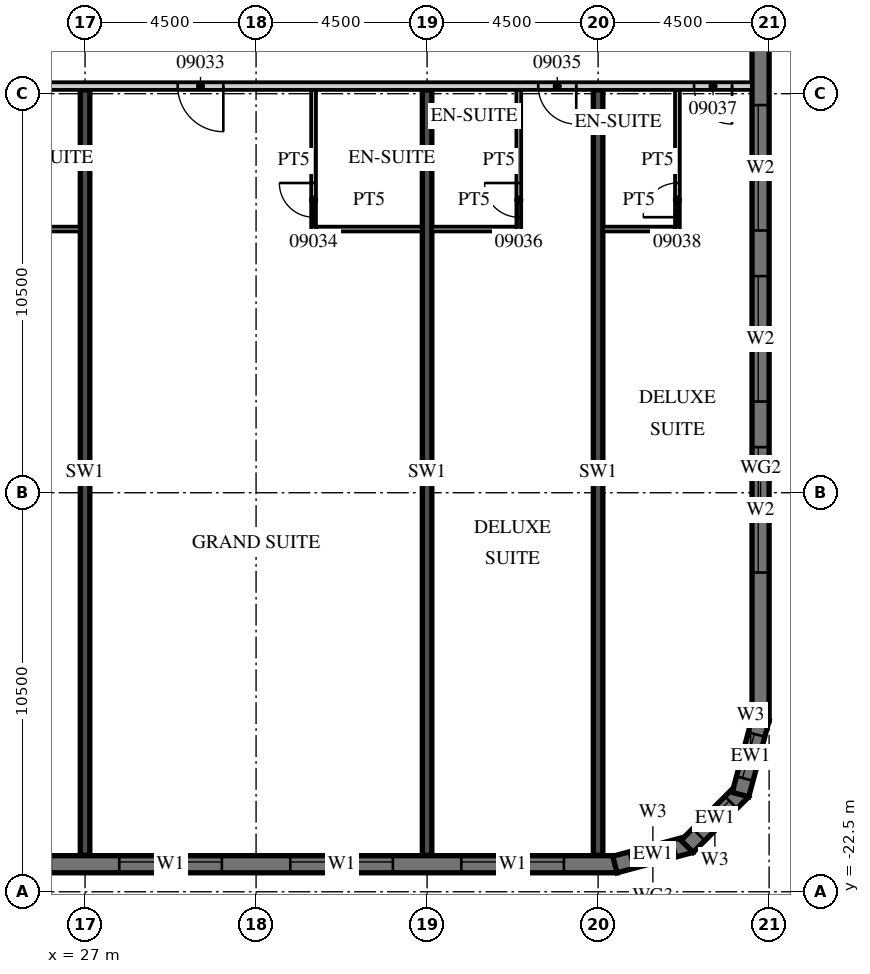
"""IFC4 building model, lengths in metres.
Left out: names, types, materials, properties, quantities, classifications, styles, units other than length and angle.
Written with IfcOpenShell. Run it as: python <this file> out.ifc"""

import sys

from ifc_helpers import new_model, si_unit, direction, frame, frame_2d, origin, place, context, subcontext, project, spatial, polyline, rectangle, outline, extrude, element, fill, save


model = new_model("IFC4")
c1 = context("Model", 3, precision=1e-05, world=origin(), true_north=direction((0.0, 1.0)))
c2 = subcontext(c1, "Body", "Model", "MODEL_VIEW")
j1 = project(units=[si_unit("LENGTHUNIT", "METRE"), si_unit("PLANEANGLEUNIT", "RADIAN")], contexts=[c1])
p1 = place(None, origin())
s1 = spatial("IfcSite", under=j1, at=p1, CompositionType="ELEMENT")
p2 = place(p1, origin())
s2 = spatial("IfcBuilding", under=s1, at=p2, CompositionType="ELEMENT")
p3 = place(p2, frame((0.0, 0.0, 60.0)))
s3 = spatial("IfcBuildingStorey", under=s2, at=p3, CompositionType="ELEMENT", Elevation=60.0)
for number, where, z_axis, x_axis in (
    (1, (27.0, -21.54, 0.0), (0.0, 0.0, 1.0), (0.0, 1.0, 0.0)),
    (2, (36.0, -21.54, 0.0), (0.0, 0.0, 1.0), (0.0, 1.0, 0.0)),
    (3, (40.5, -21.54, 0.0), (0.0, 0.0, 1.0), (0.0, 1.0, 0.0)),
):
    element("IfcWall", number, at=place(p3, frame(where, z_axis=z_axis, x_axis=x_axis)), inside=s3, PredefinedType="SHEAR", context=c2, shape_type="SweptSolid", body=[
        extrude(rectangle(XDim=20.14, YDim=0.25, at=frame_2d((10.07, 0.0))), origin(), (0.0, 0.0, 1.0), 3.3),
    ])
p4 = place(p3, frame((-13.5, -21.775, 0.0), z_axis=(0.0, 0.0, 1.0), x_axis=(1.0, 0.0, 0.0)))
e4 = element("IfcWall", 4, at=p4, inside=s3, PredefinedType="SOLIDWALL", context=c2, shape_type="SweptSolid", body=[
    extrude(rectangle(XDim=54.5, YDim=0.45, at=frame_2d((27.25, 0.0))), origin(), (0.0, 0.0, 1.0), 3.02),
])
p5 = place(p4, frame((0.9, 0.0, 0.45)))
e5 = element("IfcOpeningElement", 5, at=p5, cuts=e4, PredefinedType="OPENING", context=c2, shape_type="SweptSolid", body=[
    extrude(rectangle(XDim=2.7, YDim=2.25, at=frame_2d((1.35, 1.125))), frame((0.0, 0.235, 0.0), z_axis=(0.0, -1.0, 0.0), x_axis=(1.0, 0.0, 0.0)), (0.0, 0.0, 1.0), 0.47),
])
p6 = place(p4, frame((5.4, 0.0, 0.45)))
e6 = element("IfcOpeningElement", 6, at=p6, cuts=e4, PredefinedType="OPENING", context=c2, shape_type="SweptSolid", body=[
    extrude(rectangle(XDim=2.7, YDim=2.25, at=frame_2d((1.35, 1.125))), frame((0.0, 0.235, 0.0), z_axis=(0.0, -1.0, 0.0), x_axis=(1.0, 0.0, 0.0)), (0.0, 0.0, 1.0), 0.47),
])
p7 = place(p4, frame((9.9, 0.0, 0.45)))
e7 = element("IfcOpeningElement", 7, at=p7, cuts=e4, PredefinedType="OPENING", context=c2, shape_type="SweptSolid", body=[
    extrude(rectangle(XDim=2.7, YDim=2.25, at=frame_2d((1.35, 1.125))), frame((0.0, 0.235, 0.0), z_axis=(0.0, -1.0, 0.0), x_axis=(1.0, 0.0, 0.0)), (0.0, 0.0, 1.0), 0.47),
])
p8 = place(p4, frame((14.4, 0.0, 0.45)))
e8 = element("IfcOpeningElement", 8, at=p8, cuts=e4, PredefinedType="OPENING", context=c2, shape_type="SweptSolid", body=[
    extrude(rectangle(XDim=2.7, YDim=2.25, at=frame_2d((1.35, 1.125))), frame((0.0, 0.235, 0.0), z_axis=(0.0, -1.0, 0.0), x_axis=(1.0, 0.0, 0.0)), (0.0, 0.0, 1.0), 0.47),
])
p9 = place(p4, frame((18.9, 0.0, 0.45)))
e9 = element("IfcOpeningElement", 9, at=p9, cuts=e4, PredefinedType="OPENING", context=c2, shape_type="SweptSolid", body=[
    extrude(rectangle(XDim=2.7, YDim=2.25, at=frame_2d((1.35, 1.125))), frame((0.0, 0.235, 0.0), z_axis=(0.0, -1.0, 0.0), x_axis=(1.0, 0.0, 0.0)), (0.0, 0.0, 1.0), 0.47),
])
p10 = place(p4, frame((23.4, 0.0, 0.45)))
e10 = element("IfcOpeningElement", 10, at=p10, cuts=e4, PredefinedType="OPENING", context=c2, shape_type="SweptSolid", body=[
    extrude(rectangle(XDim=2.7, YDim=2.25, at=frame_2d((1.35, 1.125))), frame((0.0, 0.235, 0.0), z_axis=(0.0, -1.0, 0.0), x_axis=(1.0, 0.0, 0.0)), (0.0, 0.0, 1.0), 0.47),
])
p11 = place(p4, frame((27.9, 0.0, 0.45)))
e11 = element("IfcOpeningElement", 11, at=p11, cuts=e4, PredefinedType="OPENING", context=c2, shape_type="SweptSolid", body=[
    extrude(rectangle(XDim=2.7, YDim=2.25, at=frame_2d((1.35, 1.125))), frame((0.0, 0.235, 0.0), z_axis=(0.0, -1.0, 0.0), x_axis=(1.0, 0.0, 0.0)), (0.0, 0.0, 1.0), 0.47),
])
p12 = place(p4, frame((32.4, 0.0, 0.45)))
e12 = element("IfcOpeningElement", 12, at=p12, cuts=e4, PredefinedType="OPENING", context=c2, shape_type="SweptSolid", body=[
    extrude(rectangle(XDim=2.7, YDim=2.25, at=frame_2d((1.35, 1.125))), frame((0.0, 0.235, 0.0), z_axis=(0.0, -1.0, 0.0), x_axis=(1.0, 0.0, 0.0)), (0.0, 0.0, 1.0), 0.47),
])
p13 = place(p4, frame((36.9, 0.0, 0.45)))
e13 = element("IfcOpeningElement", 13, at=p13, cuts=e4, PredefinedType="OPENING", context=c2, shape_type="SweptSolid", body=[
    extrude(rectangle(XDim=2.7, YDim=2.25, at=frame_2d((1.35, 1.125))), frame((0.0, 0.235, 0.0), z_axis=(0.0, -1.0, 0.0), x_axis=(1.0, 0.0, 0.0)), (0.0, 0.0, 1.0), 0.47),
])
p14 = place(p4, frame((41.4, 0.0, 0.45)))
e14 = element("IfcOpeningElement", 14, at=p14, cuts=e4, PredefinedType="OPENING", context=c2, shape_type="SweptSolid", body=[
    extrude(rectangle(XDim=2.7, YDim=2.25, at=frame_2d((1.35, 1.125))), frame((0.0, 0.235, 0.0), z_axis=(0.0, -1.0, 0.0), x_axis=(1.0, 0.0, 0.0)), (0.0, 0.0, 1.0), 0.47),
])
p15 = place(p4, frame((45.9, 0.0, 0.45)))
e15 = element("IfcOpeningElement", 15, at=p15, cuts=e4, PredefinedType="OPENING", context=c2, shape_type="SweptSolid", body=[
    extrude(rectangle(XDim=2.7, YDim=2.25, at=frame_2d((1.35, 1.125))), frame((0.0, 0.235, 0.0), z_axis=(0.0, -1.0, 0.0), x_axis=(1.0, 0.0, 0.0)), (0.0, 0.0, 1.0), 0.47),
])
p16 = place(p4, frame((50.4, 0.0, 0.45)))
e16 = element("IfcOpeningElement", 16, at=p16, cuts=e4, PredefinedType="OPENING", context=c2, shape_type="SweptSolid", body=[
    extrude(rectangle(XDim=2.7, YDim=2.25, at=frame_2d((1.35, 1.125))), frame((0.0, 0.235, 0.0), z_axis=(0.0, -1.0, 0.0), x_axis=(1.0, 0.0, 0.0)), (0.0, 0.0, 1.0), 0.47),
])
p17 = place(p3, frame((40.942, -21.783, 0.0), z_axis=(0.0, 0.0, 1.0), x_axis=(0.965926999034, 0.25881466832, 0.0)))
e17 = element("IfcWall", 17, at=p17, inside=s3, PredefinedType="SOLIDWALL", context=c2, shape_type="SweptSolid", body=[
    extrude(outline(polyline([(0.0, -0.225), (2.071, -0.225), (1.95, 0.225), (0.121, 0.225), (0.0, -0.225)])), origin(), (0.0, 0.0, 1.0), 3.02),
])
p18 = place(p17, frame((0.435, 0.0, 0.45)))
e18 = element("IfcOpeningElement", 18, at=p18, cuts=e17, PredefinedType="OPENING", context=c2, shape_type="SweptSolid", body=[
    extrude(rectangle(XDim=1.2, YDim=2.25, at=frame_2d((0.6, 1.125))), frame((0.0, 0.235, 0.0), z_axis=(0.0, -1.0, 0.0), x_axis=(1.0, 0.0, 0.0)), (0.0, 0.0, 1.0), 0.47),
])
p19 = place(p3, frame((42.841, -21.305, 0.0), z_axis=(0.0, 0.0, 1.0), x_axis=(0.707106781187, 0.707106781187, 0.0)))
e19 = element("IfcWall", 19, at=p19, inside=s3, PredefinedType="SOLIDWALL", context=c2, shape_type="SweptSolid", body=[
    extrude(outline(polyline([(0.0, -0.225), (2.071, -0.225), (1.95, 0.225), (0.121, 0.225), (0.0, -0.225)])), origin(), (0.0, 0.0, 1.0), 3.02),
])
p20 = place(p19, frame((0.435, 0.0, 0.45)))
e20 = element("IfcOpeningElement", 20, at=p20, cuts=e19, PredefinedType="OPENING", context=c2, shape_type="SweptSolid", body=[
    extrude(rectangle(XDim=1.2, YDim=2.25, at=frame_2d((0.6, 1.125))), frame((0.0, 0.235, 0.0), z_axis=(0.0, -1.0, 0.0), x_axis=(1.0, 0.0, 0.0)), (0.0, 0.0, 1.0), 0.47),
])
p21 = place(p3, frame((44.247, -19.942, 0.0), z_axis=(0.0, 0.0, 1.0), x_axis=(0.25881466832, 0.965926999034, 0.0)))
e21 = element("IfcWall", 21, at=p21, inside=s3, PredefinedType="SOLIDWALL", context=c2, shape_type="SweptSolid", body=[
    extrude(outline(polyline([(-0.0, -0.225), (2.07, -0.225), (1.95, 0.225), (0.12, 0.225), (-0.0, -0.225)])), origin(), (0.0, 0.0, 1.0), 3.02),
])
p22 = place(p21, frame((0.435, 0.0, 0.45)))
e22 = element("IfcOpeningElement", 22, at=p22, cuts=e21, PredefinedType="OPENING", context=c2, shape_type="SweptSolid", body=[
    extrude(rectangle(XDim=1.2, YDim=2.25, at=frame_2d((0.6, 1.125))), frame((0.0, 0.235, 0.0), z_axis=(0.0, -1.0, 0.0), x_axis=(1.0, 0.0, 0.0)), (0.0, 0.0, 1.0), 0.47),
])
p23 = place(p3, frame((44.775, -18.0, 0.0), z_axis=(0.0, 0.0, 1.0), x_axis=(0.0, 1.0, 0.0)))
e23 = element("IfcWall", 23, at=p23, inside=s3, PredefinedType="SOLIDWALL", context=c2, shape_type="SweptSolid", body=[
    extrude(rectangle(XDim=36.0, YDim=0.45, at=frame_2d((18.0, 0.0))), origin(), (0.0, 0.0, 1.0), 3.02),
])
p24 = place(p23, frame((3.9, 0.0, 0.45)))
e24 = element("IfcOpeningElement", 24, at=p24, cuts=e23, PredefinedType="OPENING", context=c2, shape_type="SweptSolid", body=[
    extrude(rectangle(XDim=3.3, YDim=2.25, at=frame_2d((1.65, 1.125))), frame((0.0, 0.235, 0.0), z_axis=(0.0, -1.0, 0.0), x_axis=(1.0, 0.0, 0.0)), (0.0, 0.0, 1.0), 0.47),
])
p25 = place(p23, frame((8.4, 0.0, 0.45)))
e25 = element("IfcOpeningElement", 25, at=p25, cuts=e23, PredefinedType="OPENING", context=c2, shape_type="SweptSolid", body=[
    extrude(rectangle(XDim=3.3, YDim=2.25, at=frame_2d((1.65, 1.125))), frame((0.0, 0.235, 0.0), z_axis=(0.0, -1.0, 0.0), x_axis=(1.0, 0.0, 0.0)), (0.0, 0.0, 1.0), 0.47),
])
p26 = place(p23, frame((12.9, 0.0, 0.45)))
e26 = element("IfcOpeningElement", 26, at=p26, cuts=e23, PredefinedType="OPENING", context=c2, shape_type="SweptSolid", body=[
    extrude(rectangle(XDim=3.3, YDim=2.25, at=frame_2d((1.65, 1.125))), frame((0.0, 0.235, 0.0), z_axis=(0.0, -1.0, 0.0), x_axis=(1.0, 0.0, 0.0)), (0.0, 0.0, 1.0), 0.47),
])
p27 = place(p3, frame((-13.5, -1.3, 0.0), z_axis=(0.0, 0.0, 1.0), x_axis=(1.0, 0.0, 0.0)))
e27 = element("IfcWall", 27, at=p27, inside=s3, PredefinedType="PARTITIONING", context=c2, shape_type="SweptSolid", body=[
    extrude(rectangle(XDim=58.05, YDim=0.2, at=frame_2d((29.025, 0.0))), origin(), (0.0, 0.0, 1.0), 3.02),
])
p28 = place(p27, frame((2.925, 0.0, 0.0)))
e28 = element("IfcOpeningElement", 28, at=p28, cuts=e27, PredefinedType="OPENING", context=c2, shape_type="SweptSolid", body=[
    extrude(rectangle(XDim=1.0, YDim=2.1, at=frame_2d((0.5, 1.05))), frame((0.0, 0.11, 0.0), z_axis=(0.0, -1.0, 0.0), x_axis=(1.0, 0.0, 0.0)), (0.0, 0.0, 1.0), 0.22),
])
p29 = place(p27, frame((9.863, 0.0, 0.0)))
e29 = element("IfcOpeningElement", 29, at=p29, cuts=e27, PredefinedType="OPENING", context=c2, shape_type="SweptSolid", body=[
    extrude(rectangle(XDim=1.2, YDim=2.1, at=frame_2d((0.6, 1.05))), frame((0.0, 0.11, 0.0), z_axis=(0.0, -1.0, 0.0), x_axis=(1.0, 0.0, 0.0)), (0.0, 0.0, 1.0), 0.22),
])
p30 = place(p27, frame((16.45, 0.0, 0.0)))
e30 = element("IfcOpeningElement", 30, at=p30, cuts=e27, PredefinedType="OPENING", context=c2, shape_type="SweptSolid", body=[
    extrude(rectangle(XDim=1.0, YDim=2.1, at=frame_2d((0.5, 1.05))), frame((0.0, 0.11, 0.0), z_axis=(0.0, -1.0, 0.0), x_axis=(1.0, 0.0, 0.0)), (0.0, 0.0, 1.0), 0.22),
])
p31 = place(p27, frame((18.55, 0.0, 0.0)))
e31 = element("IfcOpeningElement", 31, at=p31, cuts=e27, PredefinedType="OPENING", context=c2, shape_type="SweptSolid", body=[
    extrude(rectangle(XDim=1.0, YDim=2.1, at=frame_2d((0.5, 1.05))), frame((0.0, 0.11, 0.0), z_axis=(0.0, -1.0, 0.0), x_axis=(1.0, 0.0, 0.0)), (0.0, 0.0, 1.0), 0.22),
])
p32 = place(p27, frame((24.938, 0.0, 0.0)))
e32 = element("IfcOpeningElement", 32, at=p32, cuts=e27, PredefinedType="OPENING", context=c2, shape_type="SweptSolid", body=[
    extrude(rectangle(XDim=1.2, YDim=2.1, at=frame_2d((0.6, 1.05))), frame((0.0, 0.11, 0.0), z_axis=(0.0, -1.0, 0.0), x_axis=(1.0, 0.0, 0.0)), (0.0, 0.0, 1.0), 0.22),
])
p33 = place(p27, frame((33.938, 0.0, 0.0)))
e33 = element("IfcOpeningElement", 33, at=p33, cuts=e27, PredefinedType="OPENING", context=c2, shape_type="SweptSolid", body=[
    extrude(rectangle(XDim=1.2, YDim=2.1, at=frame_2d((0.6, 1.05))), frame((0.0, 0.11, 0.0), z_axis=(0.0, -1.0, 0.0), x_axis=(1.0, 0.0, 0.0)), (0.0, 0.0, 1.0), 0.22),
])
p34 = place(p27, frame((42.938, 0.0, 0.0)))
e34 = element("IfcOpeningElement", 34, at=p34, cuts=e27, PredefinedType="OPENING", context=c2, shape_type="SweptSolid", body=[
    extrude(rectangle(XDim=1.2, YDim=2.1, at=frame_2d((0.6, 1.05))), frame((0.0, 0.11, 0.0), z_axis=(0.0, -1.0, 0.0), x_axis=(1.0, 0.0, 0.0)), (0.0, 0.0, 1.0), 0.22),
])
p35 = place(p27, frame((52.425, 0.0, 0.0)))
e35 = element("IfcOpeningElement", 35, at=p35, cuts=e27, PredefinedType="OPENING", context=c2, shape_type="SweptSolid", body=[
    extrude(rectangle(XDim=1.0, YDim=2.1, at=frame_2d((0.5, 1.05))), frame((0.0, 0.11, 0.0), z_axis=(0.0, -1.0, 0.0), x_axis=(1.0, 0.0, 0.0)), (0.0, 0.0, 1.0), 0.22),
])
p36 = place(p27, frame((56.525, 0.0, 0.0)))
e36 = element("IfcOpeningElement", 36, at=p36, cuts=e27, PredefinedType="OPENING", context=c2, shape_type="SweptSolid", body=[
    extrude(rectangle(XDim=1.0, YDim=2.1, at=frame_2d((0.5, 1.05))), frame((0.0, 0.11, 0.0), z_axis=(0.0, -1.0, 0.0), x_axis=(1.0, 0.0, 0.0)), (0.0, 0.0, 1.0), 0.22),
])
p37 = place(p3, frame((24.075, -5.062, 0.0), z_axis=(0.0, 0.0, 1.0), x_axis=(1.0, 0.0, 0.0)))
e37 = element("IfcWall", 37, at=p37, inside=s3, PredefinedType="PARTITIONING", context=c2, shape_type="SweptSolid", body=[
    extrude(rectangle(XDim=2.8, YDim=0.125, at=frame_2d((1.4, 0.0))), origin(), (0.0, 0.0, 1.0), 3.02),
])
p38 = place(p3, frame((33.013, -5.125, 0.0), z_axis=(0.0, 0.0, 1.0), x_axis=(0.0, 1.0, 0.0)))
e38 = element("IfcWall", 38, at=p38, inside=s3, PredefinedType="PARTITIONING", context=c2, shape_type="SweptSolid", body=[
    extrude(rectangle(XDim=3.725, YDim=0.125, at=frame_2d((1.863, 0.0))), origin(), (0.0, 0.0, 1.0), 3.02),
])
p39 = place(p38, frame((0.375, 0.0, 0.0)))
e39 = element("IfcOpeningElement", 39, at=p39, cuts=e38, PredefinedType="OPENING", context=c2, shape_type="SweptSolid", body=[
    extrude(rectangle(XDim=0.9, YDim=2.1, at=frame_2d((0.45, 1.05))), frame((0.0, 0.073, 0.0), z_axis=(0.0, -1.0, 0.0), x_axis=(1.0, 0.0, 0.0)), (0.0, 0.0, 1.0), 0.145),
])
p40 = place(p3, frame((33.075, -5.062, 0.0), z_axis=(0.0, 0.0, 1.0), x_axis=(1.0, 0.0, 0.0)))
e40 = element("IfcWall", 40, at=p40, inside=s3, PredefinedType="PARTITIONING", context=c2, shape_type="SweptSolid", body=[
    extrude(rectangle(XDim=2.8, YDim=0.125, at=frame_2d((1.4, 0.0))), origin(), (0.0, 0.0, 1.0), 3.02),
])
p41 = place(p3, frame((38.413, -5.125, 0.0), z_axis=(0.0, 0.0, 1.0), x_axis=(0.0, 1.0, 0.0)))
e41 = element("IfcWall", 41, at=p41, inside=s3, PredefinedType="PARTITIONING", context=c2, shape_type="SweptSolid", body=[
    extrude(rectangle(XDim=3.725, YDim=0.125, at=frame_2d((1.863, 0.0))), origin(), (0.0, 0.0, 1.0), 3.02),
])
p42 = place(p41, frame((0.375, 0.0, 0.0)))
e42 = element("IfcOpeningElement", 42, at=p42, cuts=e41, PredefinedType="OPENING", context=c2, shape_type="SweptSolid", body=[
    extrude(rectangle(XDim=0.9, YDim=2.1, at=frame_2d((0.45, 1.05))), frame((0.0, 0.073, 0.0), z_axis=(0.0, -1.0, 0.0), x_axis=(1.0, 0.0, 0.0)), (0.0, 0.0, 1.0), 0.145),
])
p43 = place(p3, frame((36.125, -5.062, 0.0), z_axis=(0.0, 0.0, 1.0), x_axis=(1.0, 0.0, 0.0)))
e43 = element("IfcWall", 43, at=p43, inside=s3, PredefinedType="PARTITIONING", context=c2, shape_type="SweptSolid", body=[
    extrude(rectangle(XDim=2.225, YDim=0.125, at=frame_2d((1.113, 0.0))), origin(), (0.0, 0.0, 1.0), 3.02),
])
p44 = place(p3, frame((42.587, -5.125, 0.0), z_axis=(0.0, 0.0, 1.0), x_axis=(0.0, 1.0, 0.0)))
e44 = element("IfcWall", 44, at=p44, inside=s3, PredefinedType="PARTITIONING", context=c2, shape_type="SweptSolid", body=[
    extrude(rectangle(XDim=3.725, YDim=0.125, at=frame_2d((1.863, 0.0))), origin(), (0.0, 0.0, 1.0), 3.02),
])
p45 = place(p44, frame((0.375, 0.0, 0.0)))
e45 = element("IfcOpeningElement", 45, at=p45, cuts=e44, PredefinedType="OPENING", context=c2, shape_type="SweptSolid", body=[
    extrude(rectangle(XDim=0.9, YDim=2.1, at=frame_2d((0.45, 1.05))), frame((0.0, 0.073, 0.0), z_axis=(0.0, -1.0, 0.0), x_axis=(1.0, 0.0, 0.0)), (0.0, 0.0, 1.0), 0.145),
])
p46 = place(p3, frame((40.625, -5.062, 0.0), z_axis=(0.0, 0.0, 1.0), x_axis=(1.0, 0.0, 0.0)))
e46 = element("IfcWall", 46, at=p46, inside=s3, PredefinedType="PARTITIONING", context=c2, shape_type="SweptSolid", body=[
    extrude(rectangle(XDim=1.9, YDim=0.125, at=frame_2d((0.95, 0.0))), origin(), (0.0, 0.0, 1.0), 3.02),
])
p47 = place(p14, origin())
e47 = element("IfcWindow", 47, at=p47, inside=s3, PartitioningType="SINGLE_PANEL", PredefinedType="WINDOW", context=c2, shape_type="SweptSolid", body=[
    extrude(rectangle(XDim=2.7, YDim=2.25, at=frame_2d((1.35, 1.125))), frame((0.0, 0.09, 0.0), z_axis=(0.0, -1.0, 0.0), x_axis=(1.0, 0.0, 0.0)), (0.0, 0.0, 1.0), 0.06),
])
fill(e14, e47)
p48 = place(p15, origin())
e48 = element("IfcWindow", 48, at=p48, inside=s3, PartitioningType="SINGLE_PANEL", PredefinedType="WINDOW", context=c2, shape_type="SweptSolid", body=[
    extrude(rectangle(XDim=2.7, YDim=2.25, at=frame_2d((1.35, 1.125))), frame((0.0, 0.09, 0.0), z_axis=(0.0, -1.0, 0.0), x_axis=(1.0, 0.0, 0.0)), (0.0, 0.0, 1.0), 0.06),
])
fill(e15, e48)
p49 = place(p16, origin())
e49 = element("IfcWindow", 49, at=p49, inside=s3, PartitioningType="SINGLE_PANEL", PredefinedType="WINDOW", context=c2, shape_type="SweptSolid", body=[
    extrude(rectangle(XDim=2.7, YDim=2.25, at=frame_2d((1.35, 1.125))), frame((0.0, 0.09, 0.0), z_axis=(0.0, -1.0, 0.0), x_axis=(1.0, 0.0, 0.0)), (0.0, 0.0, 1.0), 0.06),
])
fill(e16, e49)
p50 = place(p18, origin())
e50 = element("IfcWindow", 50, at=p50, inside=s3, PartitioningType="SINGLE_PANEL", PredefinedType="WINDOW", context=c2, shape_type="SweptSolid", body=[
    extrude(rectangle(XDim=1.2, YDim=2.25, at=frame_2d((0.6, 1.125))), frame((0.0, 0.09, 0.0), z_axis=(0.0, -1.0, 0.0), x_axis=(1.0, 0.0, 0.0)), (0.0, 0.0, 1.0), 0.06),
])
fill(e18, e50)
p51 = place(p20, origin())
e51 = element("IfcWindow", 51, at=p51, inside=s3, PartitioningType="SINGLE_PANEL", PredefinedType="WINDOW", context=c2, shape_type="SweptSolid", body=[
    extrude(rectangle(XDim=1.2, YDim=2.25, at=frame_2d((0.6, 1.125))), frame((0.0, 0.09, 0.0), z_axis=(0.0, -1.0, 0.0), x_axis=(1.0, 0.0, 0.0)), (0.0, 0.0, 1.0), 0.06),
])
fill(e20, e51)
p52 = place(p22, origin())
e52 = element("IfcWindow", 52, at=p52, inside=s3, PartitioningType="SINGLE_PANEL", PredefinedType="WINDOW", context=c2, shape_type="SweptSolid", body=[
    extrude(rectangle(XDim=1.2, YDim=2.25, at=frame_2d((0.6, 1.125))), frame((0.0, 0.09, 0.0), z_axis=(0.0, -1.0, 0.0), x_axis=(1.0, 0.0, 0.0)), (0.0, 0.0, 1.0), 0.06),
])
fill(e22, e52)
p53 = place(p24, origin())
e53 = element("IfcWindow", 53, at=p53, inside=s3, PartitioningType="SINGLE_PANEL", PredefinedType="WINDOW", context=c2, shape_type="SweptSolid", body=[
    extrude(rectangle(XDim=3.3, YDim=2.25, at=frame_2d((1.65, 1.125))), frame((0.0, 0.09, 0.0), z_axis=(0.0, -1.0, 0.0), x_axis=(1.0, 0.0, 0.0)), (0.0, 0.0, 1.0), 0.06),
])
fill(e24, e53)
p54 = place(p25, origin())
e54 = element("IfcWindow", 54, at=p54, inside=s3, PartitioningType="SINGLE_PANEL", PredefinedType="WINDOW", context=c2, shape_type="SweptSolid", body=[
    extrude(rectangle(XDim=3.3, YDim=2.25, at=frame_2d((1.65, 1.125))), frame((0.0, 0.09, 0.0), z_axis=(0.0, -1.0, 0.0), x_axis=(1.0, 0.0, 0.0)), (0.0, 0.0, 1.0), 0.06),
])
fill(e25, e54)
p55 = place(p26, origin())
e55 = element("IfcWindow", 55, at=p55, inside=s3, PartitioningType="SINGLE_PANEL", PredefinedType="WINDOW", context=c2, shape_type="SweptSolid", body=[
    extrude(rectangle(XDim=3.3, YDim=2.25, at=frame_2d((1.65, 1.125))), frame((0.0, 0.09, 0.0), z_axis=(0.0, -1.0, 0.0), x_axis=(1.0, 0.0, 0.0)), (0.0, 0.0, 1.0), 0.06),
])
fill(e26, e55)
p56 = place(p34, origin())
e56 = element("IfcDoor", 56, at=p56, inside=s3, OperationType="SINGLE_SWING_RIGHT", PredefinedType="DOOR", context=c2, shape_type="SweptSolid", body=[
    extrude(rectangle(XDim=1.2, YDim=2.1, at=frame_2d((0.6, 1.05))), frame((0.0, 0.025, 0.0), z_axis=(0.0, -1.0, 0.0), x_axis=(1.0, 0.0, 0.0)), (0.0, 0.0, 1.0), 0.05),
])
fill(e34, e56)
p57 = place(p39, origin())
e57 = element("IfcDoor", 57, at=p57, inside=s3, OperationType="SINGLE_SWING_RIGHT", PredefinedType="DOOR", context=c2, shape_type="SweptSolid", body=[
    extrude(rectangle(XDim=0.9, YDim=2.1, at=frame_2d((0.45, 1.05))), frame((0.0, 0.025, 0.0), z_axis=(0.0, -1.0, 0.0), x_axis=(1.0, 0.0, 0.0)), (0.0, 0.0, 1.0), 0.05),
])
fill(e39, e57)
p58 = place(p35, origin())
e58 = element("IfcDoor", 58, at=p58, inside=s3, OperationType="SINGLE_SWING_RIGHT", PredefinedType="DOOR", context=c2, shape_type="SweptSolid", body=[
    extrude(rectangle(XDim=1.0, YDim=2.1, at=frame_2d((0.5, 1.05))), frame((0.0, 0.025, 0.0), z_axis=(0.0, -1.0, 0.0), x_axis=(1.0, 0.0, 0.0)), (0.0, 0.0, 1.0), 0.05),
])
fill(e35, e58)
p59 = place(p42, origin())
e59 = element("IfcDoor", 59, at=p59, inside=s3, OperationType="SINGLE_SWING_RIGHT", PredefinedType="DOOR", context=c2, shape_type="SweptSolid", body=[
    extrude(rectangle(XDim=0.9, YDim=2.1, at=frame_2d((0.45, 1.05))), frame((0.0, 0.025, 0.0), z_axis=(0.0, -1.0, 0.0), x_axis=(1.0, 0.0, 0.0)), (0.0, 0.0, 1.0), 0.05),
])
fill(e42, e59)
p60 = place(p36, origin())
e60 = element("IfcDoor", 60, at=p60, inside=s3, OperationType="SINGLE_SWING_RIGHT", PredefinedType="DOOR", context=c2, shape_type="SweptSolid", body=[
    extrude(rectangle(XDim=1.0, YDim=2.1, at=frame_2d((0.5, 1.05))), frame((0.0, 0.025, 0.0), z_axis=(0.0, -1.0, 0.0), x_axis=(1.0, 0.0, 0.0)), (0.0, 0.0, 1.0), 0.05),
])
fill(e36, e60)
p61 = place(p45, origin())
e61 = element("IfcDoor", 61, at=p61, inside=s3, OperationType="SINGLE_SWING_LEFT", PredefinedType="DOOR", context=c2, shape_type="SweptSolid", body=[
    extrude(rectangle(XDim=0.9, YDim=2.1, at=frame_2d((0.45, 1.05))), frame((0.0, 0.025, 0.0), z_axis=(0.0, -1.0, 0.0), x_axis=(1.0, 0.0, 0.0)), (0.0, 0.0, 1.0), 0.05),
])
fill(e45, e61)
save(model, sys.argv[1])
